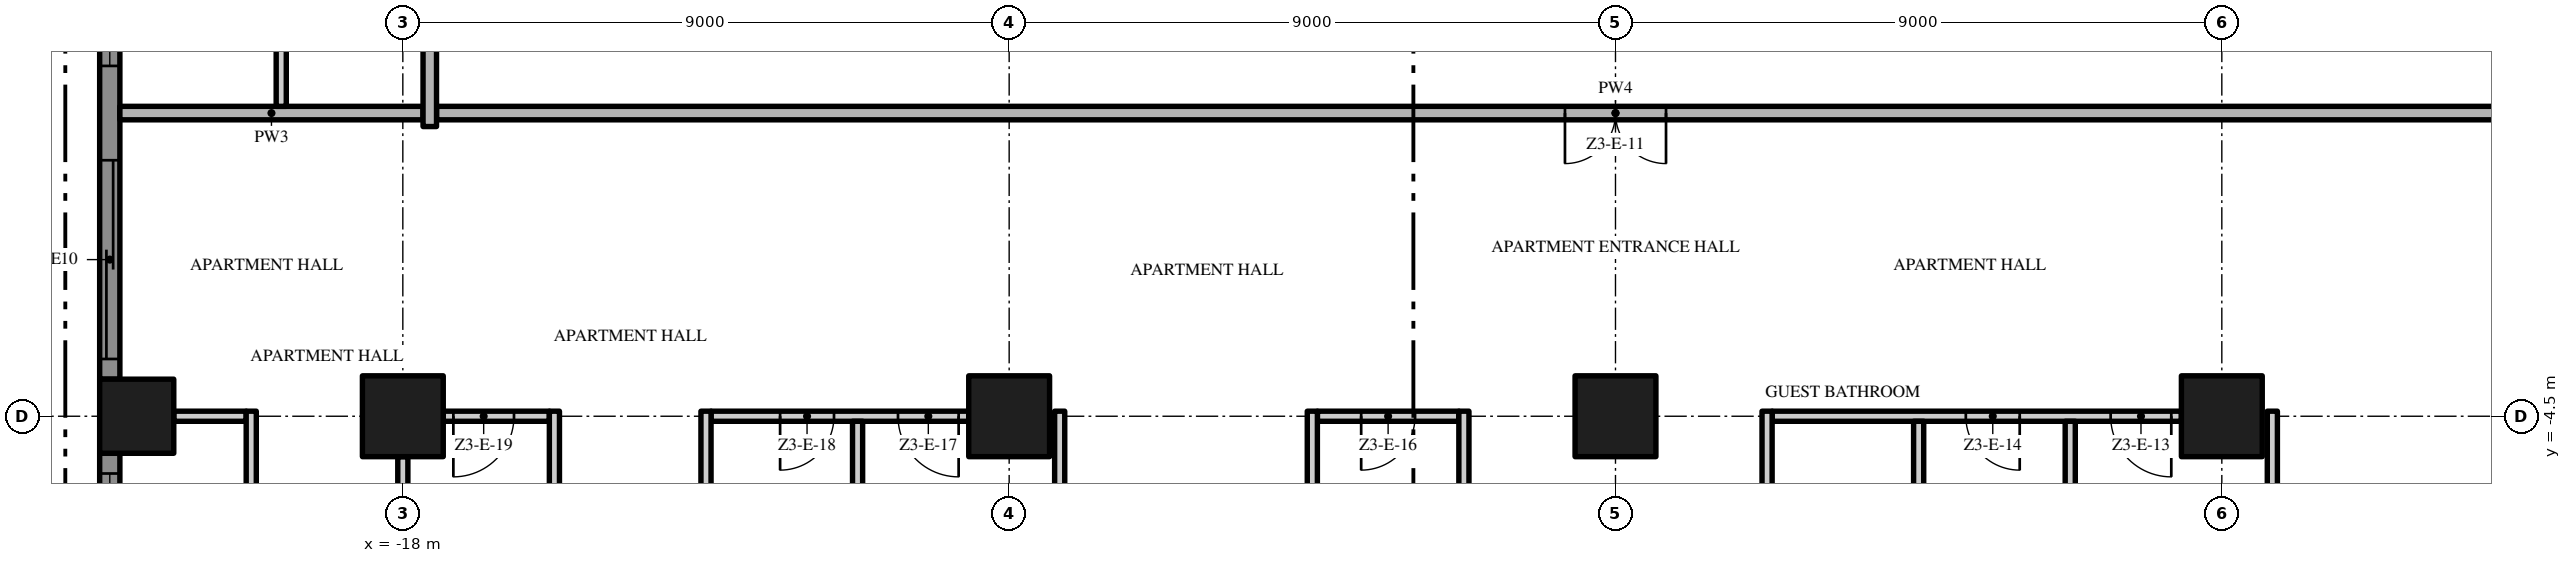
"""IFC4 building model, lengths in metres.
Left out: names, types, materials, properties, quantities, classifications, styles, units other than length and angle.
Written with IfcOpenShell. Run it as: python <this file> out.ifc"""

import sys

from ifc_helpers import new_model, si_unit, direction, frame, frame_2d, origin, origin_2d, place, context, subcontext, project, spatial, polyline, rectangle, outline, extrude, element, fill, save


model = new_model("IFC4")
c1 = context("Model", 3, precision=1e-05, world=origin(), true_north=direction((0.0, 1.0)))
c2 = subcontext(c1, "Body", "Model", "MODEL_VIEW")
j1 = project(units=[si_unit("LENGTHUNIT", "METRE"), si_unit("PLANEANGLEUNIT", "RADIAN")], contexts=[c1])
p1 = place(None, origin())
s1 = spatial("IfcSite", under=j1, at=p1, CompositionType="ELEMENT")
p2 = place(p1, origin())
s2 = spatial("IfcBuilding", under=s1, at=p2, CompositionType="ELEMENT")
p3 = place(p2, frame((0.0, 0.0, 170.6)))
s3 = spatial("IfcBuildingStorey", under=s2, at=p3, CompositionType="ELEMENT", Elevation=170.6)
p4 = place(p3, frame((-18.0, -4.5, 0.0), z_axis=(0.0, 0.0, 1.0), x_axis=(1.0, 0.0, 0.0)))
e1 = element("IfcColumn", 1, at=p4, inside=s3, PredefinedType="COLUMN", context=c2, shape_type="SweptSolid", body=[
    extrude(rectangle(XDim=1.2, YDim=1.2, at=origin_2d()), origin(), (0.0, 0.0, 1.0), 3.5),
])
p5 = place(p3, frame((-21.95, -4.5, 0.0), z_axis=(0.0, 0.0, 1.0), x_axis=(1.0, 0.0, 0.0)))
e2 = element("IfcColumn", 2, at=p5, inside=s3, PredefinedType="COLUMN", context=c2, shape_type="SweptSolid", body=[
    extrude(rectangle(XDim=1.1, YDim=1.1, at=origin_2d()), origin(), (0.0, 0.0, 1.0), 3.5),
])
for number, where, z_axis, x_axis in (
    (3, (-9.0, -4.5, 0.0), (0.0, 0.0, 1.0), (1.0, 0.0, 0.0)),
    (4, (0.0, -4.5, 0.0), (0.0, 0.0, 1.0), (1.0, 0.0, 0.0)),
    (5, (9.0, -4.5, 0.0), (0.0, 0.0, 1.0), (1.0, 0.0, 0.0)),
):
    element("IfcColumn", number, at=place(p3, frame(where, z_axis=z_axis, x_axis=x_axis)), inside=s3, PredefinedType="COLUMN", context=c2, shape_type="SweptSolid", body=[
        extrude(rectangle(XDim=1.2, YDim=1.2, at=origin_2d()), origin(), (0.0, 0.0, 1.0), 3.5),
    ])
p6 = place(p3, frame((-22.35, -3.95, 0.0), z_axis=(0.0, 0.0, 1.0), x_axis=(0.0, 1.0, 0.0)))
e6 = element("IfcWall", 6, at=p6, inside=s3, PredefinedType="SOLIDWALL", context=c2, shape_type="SweptSolid", body=[
    extrude(rectangle(XDim=7.9, YDim=0.3, at=frame_2d((3.95, 0.0))), origin(), (0.0, 0.0, 1.0), 3.5),
])
p7 = place(p6, frame((4.65, 0.0, 0.45)))
e7 = element("IfcOpeningElement", 7, at=p7, cuts=e6, PredefinedType="OPENING", context=c2, shape_type="SweptSolid", body=[
    extrude(rectangle(XDim=2.95, YDim=2.65, at=frame_2d((1.475, 1.325))), frame((0.0, 0.16, 0.0), z_axis=(0.0, -1.0, 0.0), x_axis=(1.0, 0.0, 0.0)), (0.0, 0.0, 1.0), 0.32),
])
p8 = place(p6, frame((0.3, 0.0, 0.0)))
e8 = element("IfcOpeningElement", 8, at=p8, cuts=e6, PredefinedType="OPENING", context=c2, shape_type="SweptSolid", body=[
    extrude(rectangle(XDim=2.95, YDim=2.4, at=frame_2d((1.475, 1.2))), frame((0.0, 0.16, 0.0), z_axis=(0.0, -1.0, 0.0), x_axis=(1.0, 0.0, 0.0)), (0.0, 0.0, 1.0), 0.32),
])
p9 = place(p3, frame((-22.35, -12.4, 0.0), z_axis=(0.0, 0.0, 1.0), x_axis=(0.0, 1.0, 0.0)))
e9 = element("IfcWall", 9, at=p9, inside=s3, PredefinedType="SOLIDWALL", context=c2, shape_type="SweptSolid", body=[
    extrude(rectangle(XDim=7.35, YDim=0.3, at=frame_2d((3.675, 0.0))), origin(), (0.0, 0.0, 1.0), 3.5),
])
p10 = place(p9, frame((4.1, 0.0, 0.45)))
e10 = element("IfcOpeningElement", 10, at=p10, cuts=e9, PredefinedType="OPENING", context=c2, shape_type="SweptSolid", body=[
    extrude(rectangle(XDim=2.95, YDim=2.65, at=frame_2d((1.475, 1.325))), frame((0.0, 0.16, 0.0), z_axis=(0.0, -1.0, 0.0), x_axis=(1.0, 0.0, 0.0)), (0.0, 0.0, 1.0), 0.32),
])
p11 = place(p9, frame((0.3, 0.0, 0.45)))
e11 = element("IfcOpeningElement", 11, at=p11, cuts=e9, PredefinedType="OPENING", context=c2, shape_type="SweptSolid", body=[
    extrude(rectangle(XDim=2.4, YDim=2.65, at=frame_2d((1.2, 1.325))), frame((0.0, 0.16, 0.0), z_axis=(0.0, -1.0, 0.0), x_axis=(1.0, 0.0, 0.0)), (0.0, 0.0, 1.0), 0.32),
])
p12 = place(p3, origin())
e12 = element("IfcWall", 12, at=p12, inside=s3, PredefinedType="USERDEFINED", context=c2, shape_type="SweptSolid", body=[
    extrude(outline(polyline([(-23.451, 18.0), (-24.112, 16.5), (-24.845, 15.0), (-25.369, 13.5), (-25.5, 12.375), (-25.485, 12.0), (-25.149, 10.5), (-24.488, 9.0), (-23.755, 7.5), (-23.231, 6.0), (-23.1, 4.875), (-23.115, 4.5), (-23.451, 3.0), (-24.112, 1.5), (-24.845, 0.0), (-25.369, -1.5), (-25.5, -2.625), (-25.485, -3.0), (-25.149, -4.5), (-24.488, -6.0), (-23.755, -7.5), (-23.231, -9.0), (-23.1, -10.125), (-23.115, -10.5), (-23.451, -12.0), (-24.112, -13.5), (-23.883, -13.601), (-23.213, -12.079), (-22.866, -10.533), (-22.849, -10.115), (-22.986, -8.944), (-23.524, -7.404), (-24.261, -5.895), (-24.91, -4.421), (-25.236, -2.967), (-25.249, -2.635), (-25.124, -1.556), (-24.614, -0.096), (-23.885, 1.395), (-23.213, 2.921), (-22.866, 4.467), (-22.849, 4.885), (-22.986, 6.056), (-23.524, 7.596), (-24.261, 9.105), (-24.91, 10.579), (-25.236, 12.033), (-25.249, 12.365), (-25.124, 13.444), (-24.614, 14.904), (-23.885, 16.395), (-23.223, 17.899), (-23.451, 18.0)])), origin(), (0.0, 0.0, 1.0), 0.9),
])
p13 = place(p3, frame((-21.4, -4.5, 0.0), z_axis=(0.0, 0.0, 1.0), x_axis=(1.0, 0.0, 0.0)))
e13 = element("IfcWall", 13, at=p13, inside=s3, PredefinedType="PARTITIONING", context=c2, shape_type="SweptSolid", body=[
    extrude(rectangle(XDim=1.075, YDim=0.15, at=frame_2d((0.537, 0.0))), origin(), (0.0, 0.0, 1.0), 3.5),
])
p14 = place(p3, frame((-15.825, -4.5, 0.0), z_axis=(0.0, 0.0, 1.0), x_axis=(-1.0, 0.0, 0.0)))
e14 = element("IfcWall", 14, at=p14, inside=s3, PredefinedType="PARTITIONING", context=c2, shape_type="SweptSolid", body=[
    extrude(rectangle(XDim=1.575, YDim=0.15, at=frame_2d((0.787, 0.0))), origin(), (0.0, 0.0, 1.0), 3.5),
])
p15 = place(p14, frame((0.525, 0.0, 0.0)))
e15 = element("IfcOpeningElement", 15, at=p15, cuts=e14, PredefinedType="OPENING", context=c2, shape_type="SweptSolid", body=[
    extrude(rectangle(XDim=0.9, YDim=2.1, at=frame_2d((0.45, 1.05))), frame((0.0, 0.085, 0.0), z_axis=(0.0, -1.0, 0.0), x_axis=(1.0, 0.0, 0.0)), (0.0, 0.0, 1.0), 0.17),
])
p16 = place(p3, frame((-9.6, -4.5, 0.0), z_axis=(0.0, 0.0, 1.0), x_axis=(-1.0, 0.0, 0.0)))
e16 = element("IfcWall", 16, at=p16, inside=s3, PredefinedType="PARTITIONING", context=c2, shape_type="SweptSolid", body=[
    extrude(rectangle(XDim=3.825, YDim=0.15, at=frame_2d((1.913, 0.0))), origin(), (0.0, 0.0, 1.0), 3.5),
])
p17 = place(p16, frame((0.15, 0.0, 0.0)))
e17 = element("IfcOpeningElement", 17, at=p17, cuts=e16, PredefinedType="OPENING", context=c2, shape_type="SweptSolid", body=[
    extrude(rectangle(XDim=0.9, YDim=2.1, at=frame_2d((0.45, 1.05))), frame((0.0, 0.085, 0.0), z_axis=(0.0, -1.0, 0.0), x_axis=(1.0, 0.0, 0.0)), (0.0, 0.0, 1.0), 0.17),
])
p18 = place(p16, frame((2.0, 0.0, 0.0)))
e18 = element("IfcOpeningElement", 18, at=p18, cuts=e16, PredefinedType="OPENING", context=c2, shape_type="SweptSolid", body=[
    extrude(rectangle(XDim=0.8, YDim=2.0, at=frame_2d((0.4, 1.0))), frame((0.0, 0.085, 0.0), z_axis=(0.0, -1.0, 0.0), x_axis=(1.0, 0.0, 0.0)), (0.0, 0.0, 1.0), 0.17),
])
p19 = place(p3, frame((-2.325, -4.5, 0.0), z_axis=(0.0, 0.0, 1.0), x_axis=(-1.0, 0.0, 0.0)))
e19 = element("IfcWall", 19, at=p19, inside=s3, PredefinedType="PARTITIONING", context=c2, shape_type="SweptSolid", body=[
    extrude(rectangle(XDim=2.1, YDim=0.15, at=frame_2d((1.05, 0.0))), origin(), (0.0, 0.0, 1.0), 3.5),
])
p20 = place(p19, frame((0.65, 0.0, 0.0)))
e20 = element("IfcOpeningElement", 20, at=p20, cuts=e19, PredefinedType="OPENING", context=c2, shape_type="SweptSolid", body=[
    extrude(rectangle(XDim=0.8, YDim=2.0, at=frame_2d((0.4, 1.0))), frame((0.0, 0.085, 0.0), z_axis=(0.0, -1.0, 0.0), x_axis=(1.0, 0.0, 0.0)), (0.0, 0.0, 1.0), 0.17),
])
p21 = place(p3, frame((8.4, -4.5, 0.0), z_axis=(0.0, 0.0, 1.0), x_axis=(-1.0, 0.0, 0.0)))
e21 = element("IfcWall", 21, at=p21, inside=s3, PredefinedType="PARTITIONING", context=c2, shape_type="SweptSolid", body=[
    extrude(rectangle(XDim=6.075, YDim=0.15, at=frame_2d((3.038, 0.0))), origin(), (0.0, 0.0, 1.0), 3.5),
])
p22 = place(p21, frame((0.15, 0.0, 0.0)))
e22 = element("IfcOpeningElement", 22, at=p22, cuts=e21, PredefinedType="OPENING", context=c2, shape_type="SweptSolid", body=[
    extrude(rectangle(XDim=0.9, YDim=2.1, at=frame_2d((0.45, 1.05))), frame((0.0, 0.085, 0.0), z_axis=(0.0, -1.0, 0.0), x_axis=(1.0, 0.0, 0.0)), (0.0, 0.0, 1.0), 0.17),
])
p23 = place(p21, frame((2.4, 0.0, 0.0)))
e23 = element("IfcOpeningElement", 23, at=p23, cuts=e21, PredefinedType="OPENING", context=c2, shape_type="SweptSolid", body=[
    extrude(rectangle(XDim=0.8, YDim=2.0, at=frame_2d((0.4, 1.0))), frame((0.0, 0.085, 0.0), z_axis=(0.0, -1.0, 0.0), x_axis=(1.0, 0.0, 0.0)), (0.0, 0.0, 1.0), 0.17),
])
p24 = place(p3, frame((17.5, 0.0, 0.0), z_axis=(0.0, 0.0, 1.0), x_axis=(-1.0, 0.0, 0.0)))
e24 = element("IfcWall", 24, at=p24, inside=s3, PredefinedType="PARTITIONING", context=c2, shape_type="SweptSolid", body=[
    extrude(rectangle(XDim=35.0, YDim=0.2, at=frame_2d((17.5, 0.0))), origin(), (0.0, 0.0, 1.0), 3.5),
])
p25 = place(p24, frame((16.75, 0.0, 0.0)))
e25 = element("IfcOpeningElement", 25, at=p25, cuts=e24, PredefinedType="OPENING", context=c2, shape_type="SweptSolid", body=[
    extrude(rectangle(XDim=1.5, YDim=2.4, at=frame_2d((0.75, 1.2))), frame((0.0, 0.11, 0.0), z_axis=(0.0, -1.0, 0.0), x_axis=(1.0, 0.0, 0.0)), (0.0, 0.0, 1.0), 0.22),
])
p26 = place(p3, frame((-22.2, 0.0, 0.0), z_axis=(0.0, 0.0, 1.0), x_axis=(1.0, 0.0, 0.0)))
e26 = element("IfcWall", 26, at=p26, inside=s3, PredefinedType="PARTITIONING", context=c2, shape_type="SweptSolid", body=[
    extrude(rectangle(XDim=4.5, YDim=0.2, at=frame_2d((2.25, 0.0))), origin(), (0.0, 0.0, 1.0), 3.5),
])
p27 = place(p3, frame((-20.25, -8.925, 0.0), z_axis=(0.0, 0.0, 1.0), x_axis=(0.0, 1.0, 0.0)))
e27 = element("IfcWall", 27, at=p27, inside=s3, PredefinedType="PARTITIONING", context=c2, shape_type="SweptSolid", body=[
    extrude(rectangle(XDim=4.5, YDim=0.15, at=frame_2d((2.25, 0.0))), origin(), (0.0, 0.0, 1.0), 3.5),
])
p28 = place(p27, frame((1.75, 0.0, 0.0)))
e28 = element("IfcOpeningElement", 28, at=p28, cuts=e27, PredefinedType="OPENING", context=c2, shape_type="SweptSolid", body=[
    extrude(rectangle(XDim=0.8, YDim=2.0, at=frame_2d((0.4, 1.0))), frame((0.0, 0.085, 0.0), z_axis=(0.0, -1.0, 0.0), x_axis=(1.0, 0.0, 0.0)), (0.0, 0.0, 1.0), 0.17),
])
p29 = place(p3, frame((-19.805, 0.1, 0.0), z_axis=(0.0, 0.0, 1.0), x_axis=(0.0, 1.0, 0.0)))
e29 = element("IfcWall", 29, at=p29, inside=s3, PredefinedType="PARTITIONING", context=c2, shape_type="SweptSolid", body=[
    extrude(rectangle(XDim=2.225, YDim=0.15, at=frame_2d((1.113, 0.0))), origin(), (0.0, 0.0, 1.0), 3.5),
])
p30 = place(p3, frame((-18.0, -12.9, 0.0), z_axis=(0.0, 0.0, 1.0), x_axis=(0.0, 1.0, 0.0)))
e30 = element("IfcWall", 30, at=p30, inside=s3, PredefinedType="PARTITIONING", context=c2, shape_type="SweptSolid", body=[
    extrude(rectangle(XDim=7.8, YDim=0.15, at=frame_2d((3.9, 0.0))), origin(), (0.0, 0.0, 1.0), 3.5),
])
p31 = place(p3, frame((-17.6, -0.2, 0.0), z_axis=(0.0, 0.0, 1.0), x_axis=(0.0, 1.0, 0.0)))
e31 = element("IfcWall", 31, at=p31, inside=s3, PredefinedType="PARTITIONING", context=c2, shape_type="SweptSolid", body=[
    extrude(rectangle(XDim=4.1, YDim=0.2, at=frame_2d((2.05, 0.0))), origin(), (0.0, 0.0, 1.0), 3.5),
])
p32 = place(p3, frame((-15.75, -12.075, 0.0), z_axis=(0.0, 0.0, 1.0), x_axis=(0.0, 1.0, 0.0)))
e32 = element("IfcWall", 32, at=p32, inside=s3, PredefinedType="PARTITIONING", context=c2, shape_type="SweptSolid", body=[
    extrude(rectangle(XDim=7.65, YDim=0.15, at=frame_2d((3.825, 0.0))), origin(), (0.0, 0.0, 1.0), 3.5),
])
p33 = place(p3, frame((-13.5, -17.7, 0.0), z_axis=(0.0, 0.0, 1.0), x_axis=(0.0, 1.0, 0.0)))
e33 = element("IfcWall", 33, at=p33, inside=s3, PredefinedType="PARTITIONING", context=c2, shape_type="SweptSolid", body=[
    extrude(rectangle(XDim=13.275, YDim=0.15, at=frame_2d((6.638, 0.0))), origin(), (0.0, 0.0, 1.0), 3.5),
])
p34 = place(p3, frame((-11.25, -8.925, 0.0), z_axis=(0.0, 0.0, 1.0), x_axis=(0.0, 1.0, 0.0)))
e34 = element("IfcWall", 34, at=p34, inside=s3, PredefinedType="PARTITIONING", context=c2, shape_type="SweptSolid", body=[
    extrude(rectangle(XDim=4.35, YDim=0.15, at=frame_2d((2.175, 0.0))), origin(), (0.0, 0.0, 1.0), 3.5),
])
p35 = place(p3, frame((-8.25, -8.925, 0.0), z_axis=(0.0, 0.0, 1.0), x_axis=(0.0, 1.0, 0.0)))
e35 = element("IfcWall", 35, at=p35, inside=s3, PredefinedType="PARTITIONING", context=c2, shape_type="SweptSolid", body=[
    extrude(rectangle(XDim=4.5, YDim=0.15, at=frame_2d((2.25, 0.0))), origin(), (0.0, 0.0, 1.0), 3.5),
])
p36 = place(p3, frame((-4.5, -17.7, 0.0), z_axis=(0.0, 0.0, 1.0), x_axis=(0.0, 1.0, 0.0)))
e36 = element("IfcWall", 36, at=p36, inside=s3, PredefinedType="PARTITIONING", context=c2, shape_type="SweptSolid", body=[
    extrude(rectangle(XDim=13.275, YDim=0.15, at=frame_2d((6.638, 0.0))), origin(), (0.0, 0.0, 1.0), 3.5),
])
p37 = place(p3, frame((-2.25, -12.075, 0.0), z_axis=(0.0, 0.0, 1.0), x_axis=(0.0, 1.0, 0.0)))
e37 = element("IfcWall", 37, at=p37, inside=s3, PredefinedType="PARTITIONING", context=c2, shape_type="SweptSolid", body=[
    extrude(rectangle(XDim=7.65, YDim=0.15, at=frame_2d((3.825, 0.0))), origin(), (0.0, 0.0, 1.0), 3.5),
])
p38 = place(p3, frame((2.25, -4.425, 0.0), z_axis=(0.0, 0.0, 1.0), x_axis=(0.0, -1.0, 0.0)))
e38 = element("IfcWall", 38, at=p38, inside=s3, PredefinedType="PARTITIONING", context=c2, shape_type="SweptSolid", body=[
    extrude(rectangle(XDim=7.65, YDim=0.15, at=frame_2d((3.825, 0.0))), origin(), (0.0, 0.0, 1.0), 3.5),
])
p39 = place(p38, frame((1.875, 0.0, 0.0)))
e39 = element("IfcOpeningElement", 39, at=p39, cuts=e38, PredefinedType="OPENING", context=c2, shape_type="SweptSolid", body=[
    extrude(rectangle(XDim=0.9, YDim=2.1, at=frame_2d((0.45, 1.05))), frame((0.0, 0.085, 0.0), z_axis=(0.0, -1.0, 0.0), x_axis=(1.0, 0.0, 0.0)), (0.0, 0.0, 1.0), 0.17),
])
p40 = place(p3, frame((4.5, -17.7, 0.0), z_axis=(0.0, 0.0, 1.0), x_axis=(0.0, 1.0, 0.0)))
e40 = element("IfcWall", 40, at=p40, inside=s3, PredefinedType="PARTITIONING", context=c2, shape_type="SweptSolid", body=[
    extrude(rectangle(XDim=13.125, YDim=0.15, at=frame_2d((6.562, 0.0))), origin(), (0.0, 0.0, 1.0), 3.5),
])
p41 = place(p3, frame((6.75, -12.075, 0.0), z_axis=(0.0, 0.0, 1.0), x_axis=(0.0, 1.0, 0.0)))
e41 = element("IfcWall", 41, at=p41, inside=s3, PredefinedType="PARTITIONING", context=c2, shape_type="SweptSolid", body=[
    extrude(rectangle(XDim=7.5, YDim=0.15, at=frame_2d((3.75, 0.0))), origin(), (0.0, 0.0, 1.0), 3.5),
])
p42 = place(p3, frame((9.75, -8.925, 0.0), z_axis=(0.0, 0.0, 1.0), x_axis=(0.0, 1.0, 0.0)))
e42 = element("IfcWall", 42, at=p42, inside=s3, PredefinedType="PARTITIONING", context=c2, shape_type="SweptSolid", body=[
    extrude(rectangle(XDim=4.5, YDim=0.15, at=frame_2d((2.25, 0.0))), origin(), (0.0, 0.0, 1.0), 3.5),
])
p43 = place(p7, origin())
e43 = element("IfcWindow", 43, at=p43, inside=s3, PartitioningType="SINGLE_PANEL", PredefinedType="WINDOW", context=c2, shape_type="SweptSolid", body=[
    extrude(rectangle(XDim=2.95, YDim=2.65, at=frame_2d((1.475, 1.325))), frame((0.0, 0.03, 0.0), z_axis=(0.0, -1.0, 0.0), x_axis=(1.0, 0.0, 0.0)), (0.0, 0.0, 1.0), 0.06),
])
fill(e7, e43)
p44 = place(p8, origin())
e44 = element("IfcDoor", 44, at=p44, inside=s3, OperationType="SINGLE_SWING_LEFT", PredefinedType="DOOR", context=c2, shape_type="SweptSolid", body=[
    extrude(rectangle(XDim=2.95, YDim=2.4, at=frame_2d((1.475, 1.2))), frame((0.0, 0.025, 0.0), z_axis=(0.0, -1.0, 0.0), x_axis=(1.0, 0.0, 0.0)), (0.0, 0.0, 1.0), 0.05),
])
fill(e8, e44)
p45 = place(p10, origin())
e45 = element("IfcWindow", 45, at=p45, inside=s3, PartitioningType="SINGLE_PANEL", PredefinedType="WINDOW", context=c2, shape_type="SweptSolid", body=[
    extrude(rectangle(XDim=2.95, YDim=2.65, at=frame_2d((1.475, 1.325))), frame((0.0, 0.03, 0.0), z_axis=(0.0, -1.0, 0.0), x_axis=(1.0, 0.0, 0.0)), (0.0, 0.0, 1.0), 0.06),
])
fill(e10, e45)
p46 = place(p25, origin())
e46 = element("IfcDoor", 46, at=p46, inside=s3, OperationType="DOUBLE_DOOR_SINGLE_SWING", PredefinedType="DOOR", context=c2, shape_type="SweptSolid", body=[
    extrude(rectangle(XDim=1.5, YDim=2.4, at=frame_2d((0.75, 1.2))), frame((0.0, 0.025, 0.0), z_axis=(0.0, -1.0, 0.0), x_axis=(1.0, 0.0, 0.0)), (0.0, 0.0, 1.0), 0.05),
])
fill(e25, e46)
p47 = place(p22, origin())
e47 = element("IfcDoor", 47, at=p47, inside=s3, OperationType="SINGLE_SWING_LEFT", PredefinedType="DOOR", context=c2, shape_type="SweptSolid", body=[
    extrude(rectangle(XDim=0.9, YDim=2.1, at=frame_2d((0.45, 1.05))), frame((0.0, 0.025, 0.0), z_axis=(0.0, -1.0, 0.0), x_axis=(1.0, 0.0, 0.0)), (0.0, 0.0, 1.0), 0.05),
])
fill(e22, e47)
p48 = place(p23, origin())
e48 = element("IfcDoor", 48, at=p48, inside=s3, OperationType="SINGLE_SWING_LEFT", PredefinedType="DOOR", context=c2, shape_type="SweptSolid", body=[
    extrude(rectangle(XDim=0.8, YDim=2.0, at=frame_2d((0.4, 1.0))), frame((0.0, 0.025, 0.0), z_axis=(0.0, -1.0, 0.0), x_axis=(1.0, 0.0, 0.0)), (0.0, 0.0, 1.0), 0.05),
])
fill(e23, e48)
p49 = place(p20, origin())
e49 = element("IfcDoor", 49, at=p49, inside=s3, OperationType="SINGLE_SWING_RIGHT", PredefinedType="DOOR", context=c2, shape_type="SweptSolid", body=[
    extrude(rectangle(XDim=0.8, YDim=2.0, at=frame_2d((0.4, 1.0))), frame((0.0, 0.025, 0.0), z_axis=(0.0, -1.0, 0.0), x_axis=(1.0, 0.0, 0.0)), (0.0, 0.0, 1.0), 0.05),
])
fill(e20, e49)
p50 = place(p17, origin())
e50 = element("IfcDoor", 50, at=p50, inside=s3, OperationType="SINGLE_SWING_LEFT", PredefinedType="DOOR", context=c2, shape_type="SweptSolid", body=[
    extrude(rectangle(XDim=0.9, YDim=2.1, at=frame_2d((0.45, 1.05))), frame((0.0, 0.025, 0.0), z_axis=(0.0, -1.0, 0.0), x_axis=(1.0, 0.0, 0.0)), (0.0, 0.0, 1.0), 0.05),
])
fill(e17, e50)
p51 = place(p18, origin())
e51 = element("IfcDoor", 51, at=p51, inside=s3, OperationType="SINGLE_SWING_RIGHT", PredefinedType="DOOR", context=c2, shape_type="SweptSolid", body=[
    extrude(rectangle(XDim=0.8, YDim=2.0, at=frame_2d((0.4, 1.0))), frame((0.0, 0.025, 0.0), z_axis=(0.0, -1.0, 0.0), x_axis=(1.0, 0.0, 0.0)), (0.0, 0.0, 1.0), 0.05),
])
fill(e18, e51)
p52 = place(p15, origin())
e52 = element("IfcDoor", 52, at=p52, inside=s3, OperationType="SINGLE_SWING_RIGHT", PredefinedType="DOOR", context=c2, shape_type="SweptSolid", body=[
    extrude(rectangle(XDim=0.9, YDim=2.1, at=frame_2d((0.45, 1.05))), frame((0.0, 0.025, 0.0), z_axis=(0.0, -1.0, 0.0), x_axis=(1.0, 0.0, 0.0)), (0.0, 0.0, 1.0), 0.05),
])
fill(e15, e52)
save(model, sys.argv[1])
